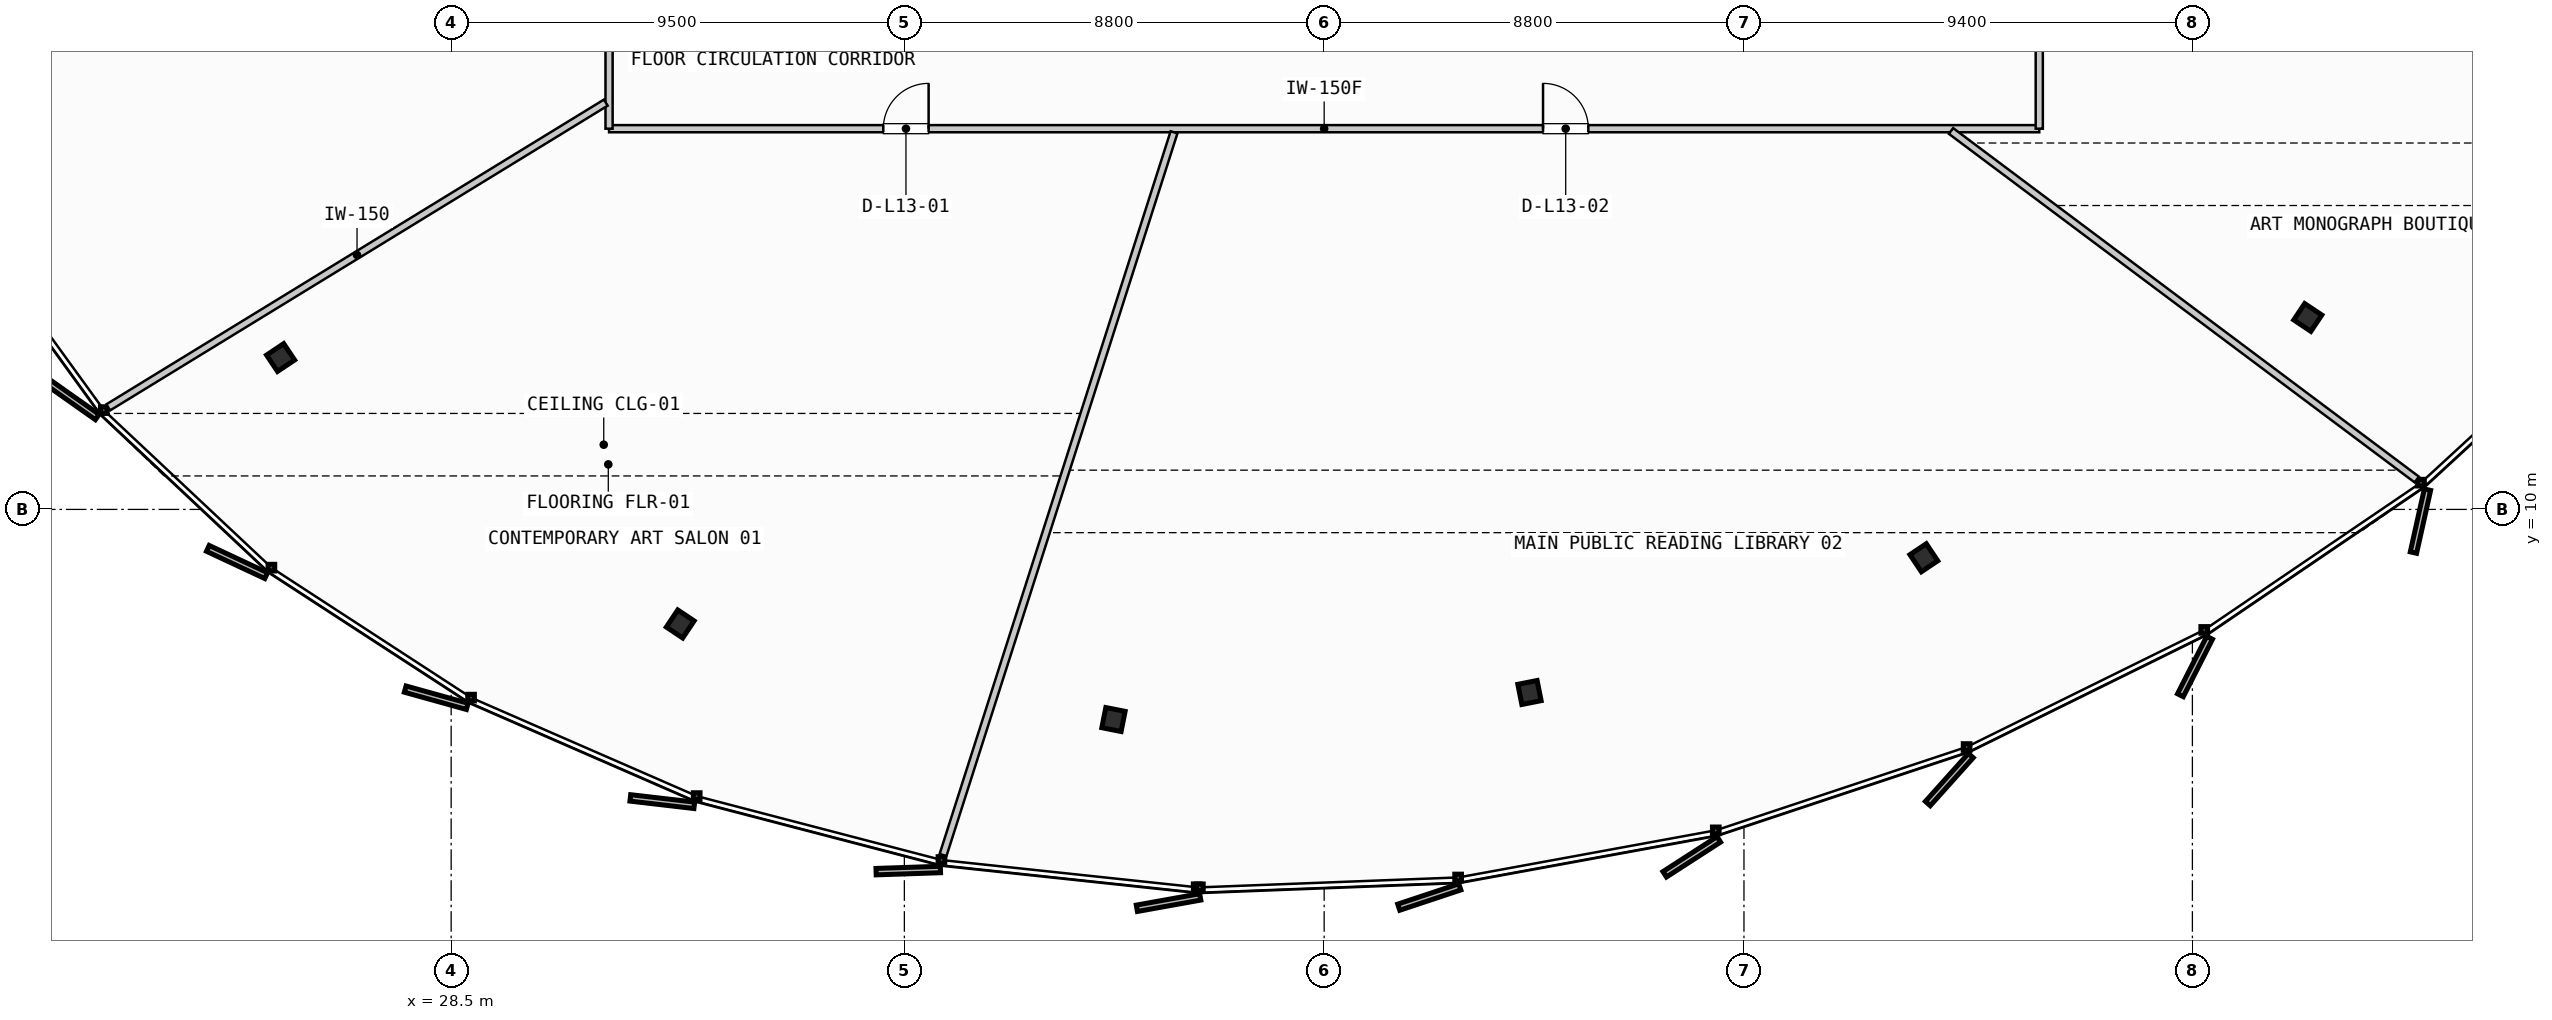
"""IFC4 building model, lengths in metres.
Left out: names, types, materials, properties, quantities, classifications, styles, units other than length and angle.
Written with IfcOpenShell. Run it as: python <this file> out.ifc"""

import sys

from ifc_helpers import new_model, si_unit, direction, frame, frame_2d, origin, origin_2d, place, context, subcontext, project, spatial, rectangle, i_section, extrude, source, transform, mapped, element, fill, save


model = new_model("IFC4")
c1 = context("Model", 3, precision=1e-05, world=origin(), true_north=direction((0.0, 1.0)))
c2 = subcontext(c1, "Body", "Model", "MODEL_VIEW")
j1 = project(units=[si_unit("LENGTHUNIT", "METRE"), si_unit("PLANEANGLEUNIT", "RADIAN")], contexts=[c1])
p1 = place(None, origin())
s1 = spatial("IfcSite", under=j1, at=p1, CompositionType="ELEMENT")
p2 = place(p1, origin())
s2 = spatial("IfcBuilding", under=s1, at=p2, CompositionType="ELEMENT")
p3 = place(p2, frame((0.0, 0.0, 56.2)))
s3 = spatial("IfcBuildingStorey", under=s2, at=p3, CompositionType="ELEMENT", Elevation=56.2)
m1 = source(origin(), c2, "Body", "SweptSolid", [
    extrude(i_section(OverallWidth=0.412, OverallDepth=0.431, WebThickness=0.042, FlangeThickness=0.068, FilletRadius=0.015, at=origin_2d()), origin(), (0.0, 0.0, 1.0), 3.55),
])
for number, where, z_axis, x_axis in (
    (1, (24.925, 13.183, 0.0), (0.0, 0.0, 1.0), (-0.831, -0.556, 0.0)),
    (2, (33.302, 7.599, 0.0), (0.0, 0.0, 1.0), (-0.556, -0.831, 0.0)),
    (3, (42.383, 5.596, 0.0), (0.0, 0.0, 1.0), (-0.195, -0.981, 0.0)),
    (4, (51.104, 6.163, 0.0), (0.0, 0.0, 1.0), (0.195, -0.981, 0.0)),
    (5, (59.37, 8.987, 0.0), (0.0, 0.0, 1.0), (0.556, -0.831, 0.0)),
    (6, (67.418, 14.023, 0.0), (0.0, 0.0, 1.0), (0.831, -0.556, 0.0)),
):
    element("IfcColumn", number, at=place(p3, frame(where, z_axis=z_axis, x_axis=x_axis)), inside=s3, PredefinedType="COLUMN", context=c2, shape_type="MappedRepresentation", body=[
        mapped(m1, transform((0.0, 0.0, 0.0), scale=1.0)),
    ])
p4 = place(p3, frame((31.81, 17.98, 0.0), z_axis=(0.0, 0.0, 1.0), x_axis=(1.0, 0.0, 0.0)))
e7 = element("IfcWall", 7, at=p4, inside=s3, PredefinedType="PARTITIONING", context=c2, shape_type="SweptSolid", body=[
    extrude(rectangle(XDim=29.98, YDim=0.15, at=frame_2d((14.99, 0.0))), origin(), (0.0, 0.0, 1.0), 2.645),
])
p5 = place(p4, frame((5.749, 0.0, 0.0)))
e8 = element("IfcOpeningElement", 8, at=p5, cuts=e7, PredefinedType="OPENING", context=c2, shape_type="SweptSolid", body=[
    extrude(rectangle(XDim=0.95, YDim=2.15, at=frame_2d((0.475, 1.075))), frame((0.0, 0.085, 0.0), z_axis=(0.0, -1.0, 0.0), x_axis=(1.0, 0.0, 0.0)), (0.0, 0.0, 1.0), 0.17),
])
p6 = place(p4, frame((19.578, 0.0, 0.0)))
e9 = element("IfcOpeningElement", 9, at=p6, cuts=e7, PredefinedType="OPENING", context=c2, shape_type="SweptSolid", body=[
    extrude(rectangle(XDim=0.95, YDim=2.15, at=frame_2d((0.475, 1.075))), frame((0.0, 0.085, 0.0), z_axis=(0.0, -1.0, 0.0), x_axis=(1.0, 0.0, 0.0)), (0.0, 0.0, 1.0), 0.17),
])
p7 = place(p3, frame((61.79, 17.98, 0.0), z_axis=(0.0, 0.0, 1.0), x_axis=(0.0, 1.0, 0.0)))
e10 = element("IfcWall", 10, at=p7, inside=s3, PredefinedType="PARTITIONING", context=c2, shape_type="SweptSolid", body=[
    extrude(rectangle(XDim=19.22, YDim=0.15, at=frame_2d((9.61, 0.0))), origin(), (0.0, 0.0, 1.0), 2.645),
])
p8 = place(p7, frame((2.332, 0.0, 0.0)))
e11 = element("IfcOpeningElement", 11, at=p8, cuts=e10, PredefinedType="OPENING", context=c2, shape_type="SweptSolid", body=[
    extrude(rectangle(XDim=0.95, YDim=2.15, at=frame_2d((0.475, 1.075))), frame((0.0, 0.085, 0.0), z_axis=(0.0, -1.0, 0.0), x_axis=(1.0, 0.0, 0.0)), (0.0, 0.0, 1.0), 0.17),
])
p9 = place(p7, frame((8.811, 0.0, 0.0)))
e12 = element("IfcOpeningElement", 12, at=p9, cuts=e10, PredefinedType="OPENING", context=c2, shape_type="SweptSolid", body=[
    extrude(rectangle(XDim=0.95, YDim=2.15, at=frame_2d((0.475, 1.075))), frame((0.0, 0.085, 0.0), z_axis=(0.0, -1.0, 0.0), x_axis=(1.0, 0.0, 0.0)), (0.0, 0.0, 1.0), 0.17),
])
p10 = place(p7, frame((15.61, 0.0, 0.0)))
e13 = element("IfcOpeningElement", 13, at=p10, cuts=e10, PredefinedType="OPENING", context=c2, shape_type="SweptSolid", body=[
    extrude(rectangle(XDim=0.95, YDim=2.15, at=frame_2d((0.475, 1.075))), frame((0.0, 0.085, 0.0), z_axis=(0.0, -1.0, 0.0), x_axis=(1.0, 0.0, 0.0)), (0.0, 0.0, 1.0), 0.17),
])
p11 = place(p3, frame((31.81, 37.2, 0.0), z_axis=(0.0, 0.0, 1.0), x_axis=(0.0, -1.0, 0.0)))
e14 = element("IfcWall", 14, at=p11, inside=s3, PredefinedType="PARTITIONING", context=c2, shape_type="SweptSolid", body=[
    extrude(rectangle(XDim=19.22, YDim=0.15, at=frame_2d((9.61, 0.0))), origin(), (0.0, 0.0, 1.0), 2.645),
])
p12 = place(p11, frame((4.263, 0.0, 0.0)))
e15 = element("IfcOpeningElement", 15, at=p12, cuts=e14, PredefinedType="OPENING", context=c2, shape_type="SweptSolid", body=[
    extrude(rectangle(XDim=0.95, YDim=2.15, at=frame_2d((0.475, 1.075))), frame((0.0, 0.085, 0.0), z_axis=(0.0, -1.0, 0.0), x_axis=(1.0, 0.0, 0.0)), (0.0, 0.0, 1.0), 0.17),
])
p13 = place(p11, frame((13.293, 0.0, 0.0)))
e16 = element("IfcOpeningElement", 16, at=p13, cuts=e14, PredefinedType="OPENING", context=c2, shape_type="SweptSolid", body=[
    extrude(rectangle(XDim=0.95, YDim=2.15, at=frame_2d((0.475, 1.075))), frame((0.0, 0.085, 0.0), z_axis=(0.0, -1.0, 0.0), x_axis=(1.0, 0.0, 0.0)), (0.0, 0.0, 1.0), 0.17),
])
p14 = place(p3, frame((31.742, 18.526, 0.0), z_axis=(0.0, 0.0, 1.0), x_axis=(-0.852795422603, -0.522245121746, 0.0)))
e17 = element("IfcWall", 17, at=p14, inside=s3, PredefinedType="PARTITIONING", context=c2, shape_type="SweptSolid", body=[
    extrude(rectangle(XDim=12.23, YDim=0.15, at=frame_2d((6.115, 0.0))), origin(), (0.0, 0.0, 1.0), 2.645),
])
p15 = place(p3, frame((43.653, 17.904, 0.0), z_axis=(0.0, 0.0, 1.0), x_axis=(-0.304468218161, -0.952522495341, 0.0)))
e18 = element("IfcWall", 18, at=p15, inside=s3, PredefinedType="PARTITIONING", context=c2, shape_type="SweptSolid", body=[
    extrude(rectangle(XDim=15.903, YDim=0.15, at=frame_2d((7.951, 0.0))), origin(), (0.0, 0.0, 1.0), 2.645),
])
p16 = place(p3, frame((59.94, 17.932, 0.0), z_axis=(0.0, 0.0, 1.0), x_axis=(0.800669778712, -0.599105921735, 0.0)))
e19 = element("IfcWall", 19, at=p16, inside=s3, PredefinedType="PARTITIONING", context=c2, shape_type="SweptSolid", body=[
    extrude(rectangle(XDim=12.195, YDim=0.15, at=frame_2d((6.097, 0.0))), origin(), (0.0, 0.0, 1.0), 2.645),
])
p17 = place(p3, frame((61.866, 22.99, 0.0), z_axis=(0.0, 0.0, 1.0), x_axis=(0.953012807574, -0.302930006107, 0.0)))
e20 = element("IfcWall", 20, at=p17, inside=s3, PredefinedType="PARTITIONING", context=c2, shape_type="SweptSolid", body=[
    extrude(rectangle(XDim=15.651, YDim=0.15, at=frame_2d((7.826, 0.0))), origin(), (0.0, 0.0, 1.0), 2.645),
])
m2 = source(origin(), c2, "Body", "SweptSolid", [
    extrude(rectangle(XDim=0.95, YDim=2.15, at=frame_2d((0.475, 1.075))), frame((0.0, 0.025, 0.0), z_axis=(0.0, -1.0, 0.0), x_axis=(1.0, 0.0, 0.0)), (0.0, 0.0, 1.0), 0.05),
])
p18 = place(p5, origin())
e21 = element("IfcDoor", 21, at=p18, inside=s3, OperationType="SINGLE_SWING_RIGHT", PredefinedType="DOOR", context=c2, shape_type="MappedRepresentation", body=[
    mapped(m2, transform((0.0, 0.0, 0.0), scale=1.0)),
])
fill(e8, e21)
p19 = place(p6, origin())
e22 = element("IfcDoor", 22, at=p19, inside=s3, OperationType="SINGLE_SWING_LEFT", PredefinedType="DOOR", context=c2, shape_type="MappedRepresentation", body=[
    mapped(m2, transform((0.0, 0.0, 0.0), scale=1.0)),
])
fill(e9, e22)
save(model, sys.argv[1])
